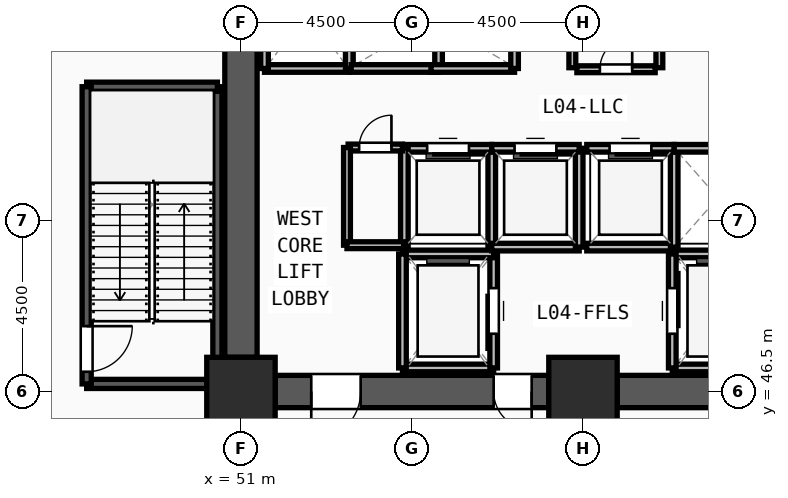
"""IFC4 building model, lengths in metres.
Left out: names, types, materials, properties, quantities, classifications, styles, units other than length and angle.
Written with IfcOpenShell. Run it as: python <this file> out.ifc"""

import sys

from ifc_helpers import new_model, si_unit, direction, frame, frame_2d, origin, origin_2d, place, context, subcontext, project, spatial, rectangle, extrude, source, transform, mapped, element, fill, save


model = new_model("IFC4")
c1 = context("Model", 3, precision=1e-05, world=origin(), true_north=direction((0.0, 1.0)))
c2 = subcontext(c1, "Body", "Model", "MODEL_VIEW")
j1 = project(units=[si_unit("LENGTHUNIT", "METRE"), si_unit("PLANEANGLEUNIT", "RADIAN")], contexts=[c1])
p1 = place(None, origin())
s1 = spatial("IfcSite", under=j1, at=p1, CompositionType="ELEMENT")
p2 = place(p1, origin())
s2 = spatial("IfcBuilding", under=s1, at=p2, CompositionType="ELEMENT")
p3 = place(p2, frame((0.0, 0.0, 14.4)))
s3 = spatial("IfcBuildingStorey", under=s2, at=p3, CompositionType="ELEMENT", Elevation=14.4)
m1 = source(origin(), c2, "Body", "SweptSolid", [
    extrude(rectangle(XDim=1.8, YDim=1.8, at=origin_2d()), origin(), (0.0, 0.0, 1.0), 4.5),
])
for number, where, z_axis, x_axis in (
    (1, (51.0, 46.5, 0.0), (0.0, 0.0, 1.0), (1.0, 0.0, 0.0)),
    (2, (60.0, 46.5, 0.0), (0.0, 0.0, 1.0), (1.0, 0.0, 0.0)),
):
    element("IfcColumn", number, at=place(p3, frame(where, z_axis=z_axis, x_axis=x_axis)), inside=s3, PredefinedType="COLUMN", context=c2, shape_type="MappedRepresentation", body=[
        mapped(m1, transform((0.0, 0.0, 0.0), x_axis=(1.0, 0.0, 0.0), y_axis=(0.0, 1.0, 0.0), z_axis=(0.0, 0.0, 1.0), scale=1.0)),
    ])
p4 = place(p3, frame((68.1, 46.5, 0.0), z_axis=(0.0, 0.0, 1.0), x_axis=(-1.0, 0.0, 0.0)))
e3 = element("IfcWall", 3, at=p4, inside=s3, PredefinedType="SHEAR", context=c2, shape_type="SweptSolid", body=[
    extrude(rectangle(XDim=7.2, YDim=0.85, at=frame_2d((3.6, 0.0))), origin(), (0.0, 0.0, 1.0), 4.25),
])
m2 = source(origin(), c2, "Body", "SweptSolid", [
    extrude(rectangle(XDim=1.3, YDim=2.2, at=frame_2d((0.65, 1.1))), frame((0.0, 0.435, 0.0), z_axis=(0.0, -1.0, 0.0), x_axis=(1.0, 0.0, 0.0)), (0.0, 0.0, 1.0), 0.87),
])
p5 = place(p4, frame((0.95, 0.0, 0.0)))
e4 = element("IfcOpeningElement", 4, at=p5, cuts=e3, PredefinedType="OPENING", context=c2, shape_type="MappedRepresentation", body=[
    mapped(m2, transform((0.0, 0.0, 0.0), x_axis=(1.0, 0.0, 0.0), y_axis=(0.0, 1.0, 0.0), z_axis=(0.0, 0.0, 1.0), scale=1.0)),
])
p6 = place(p3, frame((59.1, 46.5, 0.0), z_axis=(0.0, 0.0, 1.0), x_axis=(-1.0, 0.0, 0.0)))
e5 = element("IfcWall", 5, at=p6, inside=s3, PredefinedType="SHEAR", context=c2, shape_type="SweptSolid", body=[
    extrude(rectangle(XDim=7.2, YDim=0.85, at=frame_2d((3.6, 0.0))), origin(), (0.0, 0.0, 1.0), 4.25),
])
p7 = place(p6, frame((4.95, 0.0, 0.0)))
e6 = element("IfcOpeningElement", 6, at=p7, cuts=e5, PredefinedType="OPENING", context=c2, shape_type="MappedRepresentation", body=[
    mapped(m2, transform((0.0, 0.0, 0.0), x_axis=(1.0, 0.0, 0.0), y_axis=(0.0, 1.0, 0.0), z_axis=(0.0, 0.0, 1.0), scale=1.0)),
])
m3 = source(origin(), c2, "Body", "SweptSolid", [
    extrude(rectangle(XDim=1.0, YDim=2.2, at=frame_2d((0.5, 1.1))), frame((0.0, 0.435, 0.0), z_axis=(0.0, -1.0, 0.0), x_axis=(1.0, 0.0, 0.0)), (0.0, 0.0, 1.0), 0.87),
])
p8 = place(p6, frame((0.45, 0.0, 0.0)))
e7 = element("IfcOpeningElement", 7, at=p8, cuts=e5, PredefinedType="OPENING", context=c2, shape_type="MappedRepresentation", body=[
    mapped(m3, transform((0.0, 0.0, 0.0), x_axis=(1.0, 0.0, 0.0), y_axis=(0.0, 1.0, 0.0), z_axis=(0.0, 0.0, 1.0), scale=1.0)),
])
p9 = place(p3, frame((51.0, 47.4, 0.0), z_axis=(0.0, 0.0, 1.0), x_axis=(0.0, 1.0, 0.0)))
e8 = element("IfcWall", 8, at=p9, inside=s3, PredefinedType="SHEAR", context=c2, shape_type="SweptSolid", body=[
    extrude(rectangle(XDim=13.2, YDim=0.85, at=frame_2d((6.6, 0.0))), origin(), (0.0, 0.0, 1.0), 4.25),
])
p10 = place(p3, frame((46.94, 46.7, 0.0), z_axis=(0.0, 0.0, 1.0), x_axis=(1.0, 0.0, 0.0)))
e9 = element("IfcWall", 9, at=p10, inside=s3, PredefinedType="SOLIDWALL", context=c2, shape_type="SweptSolid", body=[
    extrude(rectangle(XDim=3.44, YDim=0.24, at=frame_2d((1.72, 0.0))), origin(), (0.0, 0.0, 1.0), 4.25),
])
p11 = place(p3, frame((50.38, 46.7, 0.0), z_axis=(0.0, 0.0, 1.0), x_axis=(0.0, 1.0, 0.0)))
e10 = element("IfcWall", 10, at=p11, inside=s3, PredefinedType="SOLIDWALL", context=c2, shape_type="SweptSolid", body=[
    extrude(rectangle(XDim=7.82, YDim=0.24, at=frame_2d((3.91, 0.0))), origin(), (0.0, 0.0, 1.0), 4.25),
])
p12 = place(p3, frame((50.38, 54.52, 0.0), z_axis=(0.0, 0.0, 1.0), x_axis=(-1.0, 0.0, 0.0)))
e11 = element("IfcWall", 11, at=p12, inside=s3, PredefinedType="SOLIDWALL", context=c2, shape_type="SweptSolid", body=[
    extrude(rectangle(XDim=3.44, YDim=0.24, at=frame_2d((1.72, 0.0))), origin(), (0.0, 0.0, 1.0), 4.25),
])
p13 = place(p3, frame((46.94, 54.52, 0.0), z_axis=(0.0, 0.0, 1.0), x_axis=(0.0, -1.0, 0.0)))
e12 = element("IfcWall", 12, at=p13, inside=s3, PredefinedType="SOLIDWALL", context=c2, shape_type="SweptSolid", body=[
    extrude(rectangle(XDim=7.82, YDim=0.24, at=frame_2d((3.91, 0.0))), origin(), (0.0, 0.0, 1.0), 4.25),
])
m4 = source(origin(), c2, "Body", "SweptSolid", [
    extrude(rectangle(XDim=1.2, YDim=2.2, at=frame_2d((0.6, 1.1))), frame((0.0, 0.13, 0.0), z_axis=(0.0, -1.0, 0.0), x_axis=(1.0, 0.0, 0.0)), (0.0, 0.0, 1.0), 0.26),
])
p14 = place(p13, frame((6.3, 0.0, 0.0)))
e13 = element("IfcOpeningElement", 13, at=p14, cuts=e12, PredefinedType="OPENING", context=c2, shape_type="MappedRepresentation", body=[
    mapped(m4, transform((0.0, 0.0, 0.0), x_axis=(1.0, 0.0, 0.0), y_axis=(0.0, 1.0, 0.0), z_axis=(0.0, 0.0, 1.0), scale=1.0)),
])
p15 = place(p3, frame((55.25, 47.12, 0.0), z_axis=(0.0, 0.0, 1.0), x_axis=(1.0, 0.0, 0.0)))
e14 = element("IfcWall", 14, at=p15, inside=s3, PredefinedType="SOLIDWALL", context=c2, shape_type="SweptSolid", body=[
    extrude(rectangle(XDim=2.4, YDim=0.2, at=frame_2d((1.2, 0.0))), origin(), (0.0, 0.0, 1.0), 4.25),
])
p16 = place(p3, frame((57.65, 47.12, 0.0), z_axis=(0.0, 0.0, 1.0), x_axis=(0.0, 1.0, 0.0)))
e15 = element("IfcWall", 15, at=p16, inside=s3, PredefinedType="SOLIDWALL", context=c2, shape_type="SweptSolid", body=[
    extrude(rectangle(XDim=3.0, YDim=0.2, at=frame_2d((1.5, 0.0))), origin(), (0.0, 0.0, 1.0), 4.25),
])
m5 = source(origin(), c2, "Body", "SweptSolid", [
    extrude(rectangle(XDim=1.2, YDim=2.3, at=frame_2d((0.6, 1.15))), frame((0.0, 0.11, 0.0), z_axis=(0.0, -1.0, 0.0), x_axis=(1.0, 0.0, 0.0)), (0.0, 0.0, 1.0), 0.22),
])
p17 = place(p16, frame((0.9, 0.0, 0.0)))
e16 = element("IfcOpeningElement", 16, at=p17, cuts=e15, PredefinedType="OPENING", context=c2, shape_type="MappedRepresentation", body=[
    mapped(m5, transform((0.0, 0.0, 0.0), x_axis=(1.0, 0.0, 0.0), y_axis=(0.0, 1.0, 0.0), z_axis=(0.0, 0.0, 1.0), scale=1.0)),
])
p18 = place(p3, frame((57.65, 50.12, 0.0), z_axis=(0.0, 0.0, 1.0), x_axis=(-1.0, 0.0, 0.0)))
e17 = element("IfcWall", 17, at=p18, inside=s3, PredefinedType="SOLIDWALL", context=c2, shape_type="SweptSolid", body=[
    extrude(rectangle(XDim=2.4, YDim=0.2, at=frame_2d((1.2, 0.0))), origin(), (0.0, 0.0, 1.0), 4.25),
])
p19 = place(p3, frame((55.25, 50.12, 0.0), z_axis=(0.0, 0.0, 1.0), x_axis=(0.0, -1.0, 0.0)))
e18 = element("IfcWall", 18, at=p19, inside=s3, PredefinedType="SOLIDWALL", context=c2, shape_type="SweptSolid", body=[
    extrude(rectangle(XDim=3.0, YDim=0.2, at=frame_2d((1.5, 0.0))), origin(), (0.0, 0.0, 1.0), 4.25),
])
for number, where, z_axis, x_axis in (
    (19, (62.35, 47.12, 0.0), (0.0, 0.0, 1.0), (1.0, 0.0, 0.0)),
    (20, (64.75, 50.12, 0.0), (0.0, 0.0, 1.0), (-1.0, 0.0, 0.0)),
):
    element("IfcWall", number, at=place(p3, frame(where, z_axis=z_axis, x_axis=x_axis)), inside=s3, PredefinedType="SOLIDWALL", context=c2, shape_type="SweptSolid", body=[
        extrude(rectangle(XDim=2.4, YDim=0.2, at=frame_2d((1.2, 0.0))), origin(), (0.0, 0.0, 1.0), 4.25),
    ])
p20 = place(p3, frame((62.35, 50.12, 0.0), z_axis=(0.0, 0.0, 1.0), x_axis=(0.0, -1.0, 0.0)))
e21 = element("IfcWall", 21, at=p20, inside=s3, PredefinedType="SOLIDWALL", context=c2, shape_type="SweptSolid", body=[
    extrude(rectangle(XDim=3.0, YDim=0.2, at=frame_2d((1.5, 0.0))), origin(), (0.0, 0.0, 1.0), 4.25),
])
p21 = place(p20, frame((0.9, 0.0, 0.0)))
e22 = element("IfcOpeningElement", 22, at=p21, cuts=e21, PredefinedType="OPENING", context=c2, shape_type="MappedRepresentation", body=[
    mapped(m5, transform((0.0, 0.0, 0.0), x_axis=(1.0, 0.0, 0.0), y_axis=(0.0, 1.0, 0.0), z_axis=(0.0, 0.0, 1.0), scale=1.0)),
])
p22 = place(p3, frame((51.62, 55.0, 0.0), z_axis=(0.0, 0.0, 1.0), x_axis=(1.0, 0.0, 0.0)))
e23 = element("IfcWall", 23, at=p22, inside=s3, PredefinedType="SOLIDWALL", context=c2, shape_type="SweptSolid", body=[
    extrude(rectangle(XDim=2.23, YDim=0.2, at=frame_2d((1.115, 0.0))), origin(), (0.0, 0.0, 1.0), 4.25),
])
for number, where, z_axis, x_axis in (
    (24, (53.85, 55.0, 0.0), (0.0, 0.0, 1.0), (0.0, 1.0, 0.0)),
    (25, (51.62, 58.0, 0.0), (0.0, 0.0, 1.0), (0.0, -1.0, 0.0)),
):
    element("IfcWall", number, at=place(p3, frame(where, z_axis=z_axis, x_axis=x_axis)), inside=s3, PredefinedType="SOLIDWALL", context=c2, shape_type="SweptSolid", body=[
        extrude(rectangle(XDim=3.0, YDim=0.2, at=frame_2d((1.5, 0.0))), origin(), (0.0, 0.0, 1.0), 4.25),
    ])
p23 = place(p3, frame((57.6, 50.3, 0.0), z_axis=(0.0, 0.0, 1.0), x_axis=(0.0, 1.0, 0.0)))
e26 = element("IfcWall", 26, at=p23, inside=s3, PredefinedType="SOLIDWALL", context=c2, shape_type="SweptSolid", body=[
    extrude(rectangle(XDim=2.6, YDim=0.2, at=frame_2d((1.3, 0.0))), origin(), (0.0, 0.0, 1.0), 4.25),
])
p24 = place(p3, frame((57.6, 52.9, 0.0), z_axis=(0.0, 0.0, 1.0), x_axis=(-1.0, 0.0, 0.0)))
e27 = element("IfcWall", 27, at=p24, inside=s3, PredefinedType="SOLIDWALL", context=c2, shape_type="SweptSolid", body=[
    extrude(rectangle(XDim=2.3, YDim=0.2, at=frame_2d((1.15, 0.0))), origin(), (0.0, 0.0, 1.0), 4.25),
])
m6 = source(origin(), c2, "Body", "SweptSolid", [
    extrude(rectangle(XDim=1.1, YDim=2.2, at=frame_2d((0.55, 1.1))), frame((0.0, 0.11, 0.0), z_axis=(0.0, -1.0, 0.0), x_axis=(1.0, 0.0, 0.0)), (0.0, 0.0, 1.0), 0.22),
])
p25 = place(p24, frame((0.6, 0.0, 0.0)))
e28 = element("IfcOpeningElement", 28, at=p25, cuts=e27, PredefinedType="OPENING", context=c2, shape_type="MappedRepresentation", body=[
    mapped(m6, transform((0.0, 0.0, 0.0), x_axis=(1.0, 0.0, 0.0), y_axis=(0.0, 1.0, 0.0), z_axis=(0.0, 0.0, 1.0), scale=1.0)),
])
p26 = place(p3, frame((55.3, 52.9, 0.0), z_axis=(0.0, 0.0, 1.0), x_axis=(0.0, -1.0, 0.0)))
e29 = element("IfcWall", 29, at=p26, inside=s3, PredefinedType="SOLIDWALL", context=c2, shape_type="SweptSolid", body=[
    extrude(rectangle(XDim=2.6, YDim=0.2, at=frame_2d((1.3, 0.0))), origin(), (0.0, 0.0, 1.0), 4.25),
])
p27 = place(p3, frame((57.6, 50.3, 0.0), z_axis=(0.0, 0.0, 1.0), x_axis=(1.0, 0.0, 0.0)))
e30 = element("IfcWall", 30, at=p27, inside=s3, PredefinedType="SOLIDWALL", context=c2, shape_type="SweptSolid", body=[
    extrude(rectangle(XDim=2.3, YDim=0.2, at=frame_2d((1.15, 0.0))), origin(), (0.0, 0.0, 1.0), 4.25),
])
p28 = place(p3, frame((59.9, 50.3, 0.0), z_axis=(0.0, 0.0, 1.0), x_axis=(0.0, 1.0, 0.0)))
e31 = element("IfcWall", 31, at=p28, inside=s3, PredefinedType="SOLIDWALL", context=c2, shape_type="SweptSolid", body=[
    extrude(rectangle(XDim=2.6, YDim=0.2, at=frame_2d((1.3, 0.0))), origin(), (0.0, 0.0, 1.0), 4.25),
])
p29 = place(p3, frame((59.9, 52.9, 0.0), z_axis=(0.0, 0.0, 1.0), x_axis=(-1.0, 0.0, 0.0)))
e32 = element("IfcWall", 32, at=p29, inside=s3, PredefinedType="SOLIDWALL", context=c2, shape_type="SweptSolid", body=[
    extrude(rectangle(XDim=2.3, YDim=0.2, at=frame_2d((1.15, 0.0))), origin(), (0.0, 0.0, 1.0), 4.25),
])
p30 = place(p29, frame((0.6, 0.0, 0.0)))
e33 = element("IfcOpeningElement", 33, at=p30, cuts=e32, PredefinedType="OPENING", context=c2, shape_type="MappedRepresentation", body=[
    mapped(m6, transform((0.0, 0.0, 0.0), x_axis=(1.0, 0.0, 0.0), y_axis=(0.0, 1.0, 0.0), z_axis=(0.0, 0.0, 1.0), scale=1.0)),
])
p31 = place(p3, frame((60.1, 50.3, 0.0), z_axis=(0.0, 0.0, 1.0), x_axis=(1.0, 0.0, 0.0)))
e34 = element("IfcWall", 34, at=p31, inside=s3, PredefinedType="SOLIDWALL", context=c2, shape_type="SweptSolid", body=[
    extrude(rectangle(XDim=2.3, YDim=0.2, at=frame_2d((1.15, 0.0))), origin(), (0.0, 0.0, 1.0), 4.25),
])
p32 = place(p3, frame((62.4, 50.3, 0.0), z_axis=(0.0, 0.0, 1.0), x_axis=(0.0, 1.0, 0.0)))
e35 = element("IfcWall", 35, at=p32, inside=s3, PredefinedType="SOLIDWALL", context=c2, shape_type="SweptSolid", body=[
    extrude(rectangle(XDim=2.6, YDim=0.2, at=frame_2d((1.3, 0.0))), origin(), (0.0, 0.0, 1.0), 4.25),
])
p33 = place(p3, frame((62.4, 52.9, 0.0), z_axis=(0.0, 0.0, 1.0), x_axis=(-1.0, 0.0, 0.0)))
e36 = element("IfcWall", 36, at=p33, inside=s3, PredefinedType="SOLIDWALL", context=c2, shape_type="SweptSolid", body=[
    extrude(rectangle(XDim=2.3, YDim=0.2, at=frame_2d((1.15, 0.0))), origin(), (0.0, 0.0, 1.0), 4.25),
])
p34 = place(p33, frame((0.6, 0.0, 0.0)))
e37 = element("IfcOpeningElement", 37, at=p34, cuts=e36, PredefinedType="OPENING", context=c2, shape_type="MappedRepresentation", body=[
    mapped(m6, transform((0.0, 0.0, 0.0), x_axis=(1.0, 0.0, 0.0), y_axis=(0.0, 1.0, 0.0), z_axis=(0.0, 0.0, 1.0), scale=1.0)),
])
for number, where, z_axis, x_axis in (
    (38, (64.7, 52.9, 0.0), (0.0, 0.0, 1.0), (-1.0, 0.0, 0.0)),
    (39, (53.9, 55.0, 0.0), (0.0, 0.0, 1.0), (1.0, 0.0, 0.0)),
):
    element("IfcWall", number, at=place(p3, frame(where, z_axis=z_axis, x_axis=x_axis)), inside=s3, PredefinedType="SOLIDWALL", context=c2, shape_type="SweptSolid", body=[
        extrude(rectangle(XDim=2.3, YDim=0.2, at=frame_2d((1.15, 0.0))), origin(), (0.0, 0.0, 1.0), 4.25),
    ])
p35 = place(p3, frame((56.2, 55.0, 0.0), z_axis=(0.0, 0.0, 1.0), x_axis=(0.0, 1.0, 0.0)))
e40 = element("IfcWall", 40, at=p35, inside=s3, PredefinedType="SOLIDWALL", context=c2, shape_type="SweptSolid", body=[
    extrude(rectangle(XDim=2.6, YDim=0.2, at=frame_2d((1.3, 0.0))), origin(), (0.0, 0.0, 1.0), 4.25),
])
p36 = place(p3, frame((56.0, 55.0, 0.0), z_axis=(0.0, 0.0, 1.0), x_axis=(1.0, 0.0, 0.0)))
e41 = element("IfcWall", 41, at=p36, inside=s3, PredefinedType="SOLIDWALL", context=c2, shape_type="SweptSolid", body=[
    extrude(rectangle(XDim=2.2, YDim=0.2, at=frame_2d((1.1, 0.0))), origin(), (0.0, 0.0, 1.0), 4.25),
])
p37 = place(p3, frame((58.2, 55.0, 0.0), z_axis=(0.0, 0.0, 1.0), x_axis=(0.0, 1.0, 0.0)))
e42 = element("IfcWall", 42, at=p37, inside=s3, PredefinedType="SOLIDWALL", context=c2, shape_type="SweptSolid", body=[
    extrude(rectangle(XDim=2.6, YDim=0.2, at=frame_2d((1.3, 0.0))), origin(), (0.0, 0.0, 1.0), 4.25),
])
p38 = place(p3, frame((59.84, 54.98, 0.0), z_axis=(0.0, 0.0, 1.0), x_axis=(1.0, 0.0, 0.0)))
e43 = element("IfcWall", 43, at=p38, inside=s3, PredefinedType="PARTITIONING", context=c2, shape_type="SweptSolid", body=[
    extrude(rectangle(XDim=2.06, YDim=0.18, at=frame_2d((1.03, 0.0))), origin(), (0.0, 0.0, 1.0), 4.25),
])
m7 = source(origin(), c2, "Body", "SweptSolid", [
    extrude(rectangle(XDim=0.85, YDim=2.1, at=frame_2d((0.425, 1.05))), frame((0.0, 0.1, 0.0), z_axis=(0.0, -1.0, 0.0), x_axis=(1.0, 0.0, 0.0)), (0.0, 0.0, 1.0), 0.2),
])
p39 = place(p38, frame((0.605, 0.0, 0.0)))
e44 = element("IfcOpeningElement", 44, at=p39, cuts=e43, PredefinedType="OPENING", context=c2, shape_type="MappedRepresentation", body=[
    mapped(m7, transform((0.0, 0.0, 0.0), x_axis=(1.0, 0.0, 0.0), y_axis=(0.0, 1.0, 0.0), z_axis=(0.0, 0.0, 1.0), scale=1.0)),
])
p40 = place(p3, frame((53.82, 52.92, 0.0), z_axis=(0.0, 0.0, 1.0), x_axis=(1.0, 0.0, 0.0)))
e45 = element("IfcWall", 45, at=p40, inside=s3, PredefinedType="PARTITIONING", context=c2, shape_type="SweptSolid", body=[
    extrude(rectangle(XDim=1.43, YDim=0.18, at=frame_2d((0.715, 0.0))), origin(), (0.0, 0.0, 1.0), 4.25),
])
p41 = place(p40, frame((0.29, 0.0, 0.0)))
e46 = element("IfcOpeningElement", 46, at=p41, cuts=e45, PredefinedType="OPENING", context=c2, shape_type="MappedRepresentation", body=[
    mapped(m7, transform((0.0, 0.0, 0.0), x_axis=(1.0, 0.0, 0.0), y_axis=(0.0, 1.0, 0.0), z_axis=(0.0, 0.0, 1.0), scale=1.0)),
])
for number, where, z_axis, x_axis in (
    (47, (59.72, 55.02, 0.0), (0.0, 0.0, 1.0), (0.0, 1.0, 0.0)),
    (48, (62.01, 55.02, 0.0), (0.0, 0.0, 1.0), (0.0, 1.0, 0.0)),
):
    element("IfcWall", number, at=place(p3, frame(where, z_axis=z_axis, x_axis=x_axis)), inside=s3, PredefinedType="PARTITIONING", context=c2, shape_type="SweptSolid", body=[
        extrude(rectangle(XDim=2.88, YDim=0.18, at=frame_2d((1.44, 0.0))), origin(), (0.0, 0.0, 1.0), 4.25),
    ])
p42 = place(p3, frame((53.79, 50.35, 0.0), z_axis=(0.0, 0.0, 1.0), x_axis=(0.0, 1.0, 0.0)))
e49 = element("IfcWall", 49, at=p42, inside=s3, PredefinedType="PARTITIONING", context=c2, shape_type="SweptSolid", body=[
    extrude(rectangle(XDim=2.57, YDim=0.18, at=frame_2d((1.285, 0.0))), origin(), (0.0, 0.0, 1.0), 4.25),
])
p43 = place(p3, frame((53.79, 50.35, 0.0), z_axis=(0.0, 0.0, 1.0), x_axis=(1.0, 0.0, 0.0)))
e50 = element("IfcWall", 50, at=p43, inside=s3, PredefinedType="PARTITIONING", context=c2, shape_type="SweptSolid", body=[
    extrude(rectangle(XDim=1.49, YDim=0.18, at=frame_2d((0.745, 0.0))), origin(), (0.0, 0.0, 1.0), 4.25),
])
m8 = source(origin(), c2, "Body", "SweptSolid", [
    extrude(rectangle(XDim=1.3, YDim=2.2, at=frame_2d((0.65, 1.1))), frame((0.0, 0.025, 0.0), z_axis=(0.0, -1.0, 0.0), x_axis=(1.0, 0.0, 0.0)), (0.0, 0.0, 1.0), 0.05),
])
p44 = place(p7, origin())
e51 = element("IfcDoor", 51, at=p44, inside=s3, OperationType="SINGLE_SWING_RIGHT", PredefinedType="DOOR", context=c2, shape_type="MappedRepresentation", body=[
    mapped(m8, transform((0.0, 0.0, 0.0), x_axis=(1.0, 0.0, 0.0), y_axis=(0.0, 1.0, 0.0), z_axis=(0.0, 0.0, 1.0), scale=1.0)),
])
fill(e6, e51)
m9 = source(origin(), c2, "Body", "SweptSolid", [
    extrude(rectangle(XDim=1.0, YDim=2.2, at=frame_2d((0.5, 1.1))), frame((0.0, 0.025, 0.0), z_axis=(0.0, -1.0, 0.0), x_axis=(1.0, 0.0, 0.0)), (0.0, 0.0, 1.0), 0.05),
])
p45 = place(p8, origin())
e52 = element("IfcDoor", 52, at=p45, inside=s3, OperationType="SINGLE_SWING_LEFT", PredefinedType="DOOR", context=c2, shape_type="MappedRepresentation", body=[
    mapped(m9, transform((0.0, 0.0, 0.0), x_axis=(1.0, 0.0, 0.0), y_axis=(0.0, 1.0, 0.0), z_axis=(0.0, 0.0, 1.0), scale=1.0)),
])
fill(e7, e52)
m10 = source(origin(), c2, "Body", "SweptSolid", [
    extrude(rectangle(XDim=1.2, YDim=2.2, at=frame_2d((0.6, 1.1))), frame((0.0, 0.025, 0.0), z_axis=(0.0, -1.0, 0.0), x_axis=(1.0, 0.0, 0.0)), (0.0, 0.0, 1.0), 0.05),
])
p46 = place(p14, origin())
e53 = element("IfcDoor", 53, at=p46, inside=s3, OperationType="SINGLE_SWING_LEFT", PredefinedType="DOOR", context=c2, shape_type="MappedRepresentation", body=[
    mapped(m10, transform((0.0, 0.0, 0.0), x_axis=(1.0, 0.0, 0.0), y_axis=(0.0, 1.0, 0.0), z_axis=(0.0, 0.0, 1.0), scale=1.0)),
])
fill(e13, e53)
m11 = source(origin(), c2, "Body", "SweptSolid", [
    extrude(rectangle(XDim=1.2, YDim=2.3, at=frame_2d((0.6, 1.15))), frame((0.0, 0.025, 0.0), z_axis=(0.0, -1.0, 0.0), x_axis=(1.0, 0.0, 0.0)), (0.0, 0.0, 1.0), 0.05),
])
p47 = place(p17, origin())
e54 = element("IfcDoor", 54, at=p47, inside=s3, OperationType="SLIDING_TO_LEFT", PredefinedType="DOOR", context=c2, shape_type="MappedRepresentation", body=[
    mapped(m11, transform((0.0, 0.0, 0.0), x_axis=(1.0, 0.0, 0.0), y_axis=(0.0, 1.0, 0.0), z_axis=(0.0, 0.0, 1.0), scale=1.0)),
])
fill(e16, e54)
p48 = place(p21, origin())
e55 = element("IfcDoor", 55, at=p48, inside=s3, OperationType="SLIDING_TO_LEFT", PredefinedType="DOOR", context=c2, shape_type="MappedRepresentation", body=[
    mapped(m11, transform((0.0, 0.0, 0.0), x_axis=(1.0, 0.0, 0.0), y_axis=(0.0, 1.0, 0.0), z_axis=(0.0, 0.0, 1.0), scale=1.0)),
])
fill(e22, e55)
m12 = source(origin(), c2, "Body", "SweptSolid", [
    extrude(rectangle(XDim=1.1, YDim=2.2, at=frame_2d((0.55, 1.1))), frame((0.0, 0.025, 0.0), z_axis=(0.0, -1.0, 0.0), x_axis=(1.0, 0.0, 0.0)), (0.0, 0.0, 1.0), 0.05),
])
p49 = place(p25, origin())
e56 = element("IfcDoor", 56, at=p49, inside=s3, OperationType="SLIDING_TO_LEFT", PredefinedType="DOOR", context=c2, shape_type="MappedRepresentation", body=[
    mapped(m12, transform((0.0, 0.0, 0.0), x_axis=(1.0, 0.0, 0.0), y_axis=(0.0, 1.0, 0.0), z_axis=(0.0, 0.0, 1.0), scale=1.0)),
])
fill(e28, e56)
p50 = place(p30, origin())
e57 = element("IfcDoor", 57, at=p50, inside=s3, OperationType="SLIDING_TO_LEFT", PredefinedType="DOOR", context=c2, shape_type="MappedRepresentation", body=[
    mapped(m12, transform((0.0, 0.0, 0.0), x_axis=(1.0, 0.0, 0.0), y_axis=(0.0, 1.0, 0.0), z_axis=(0.0, 0.0, 1.0), scale=1.0)),
])
fill(e33, e57)
p51 = place(p34, origin())
e58 = element("IfcDoor", 58, at=p51, inside=s3, OperationType="SLIDING_TO_LEFT", PredefinedType="DOOR", context=c2, shape_type="MappedRepresentation", body=[
    mapped(m12, transform((0.0, 0.0, 0.0), x_axis=(1.0, 0.0, 0.0), y_axis=(0.0, 1.0, 0.0), z_axis=(0.0, 0.0, 1.0), scale=1.0)),
])
fill(e37, e58)
m13 = source(origin(), c2, "Body", "SweptSolid", [
    extrude(rectangle(XDim=0.85, YDim=2.1, at=frame_2d((0.425, 1.05))), frame((0.0, 0.025, 0.0), z_axis=(0.0, -1.0, 0.0), x_axis=(1.0, 0.0, 0.0)), (0.0, 0.0, 1.0), 0.05),
])
p52 = place(p39, origin())
e59 = element("IfcDoor", 59, at=p52, inside=s3, OperationType="SINGLE_SWING_RIGHT", PredefinedType="DOOR", context=c2, shape_type="MappedRepresentation", body=[
    mapped(m13, transform((0.0, 0.0, 0.0), x_axis=(1.0, 0.0, 0.0), y_axis=(0.0, 1.0, 0.0), z_axis=(0.0, 0.0, 1.0), scale=1.0)),
])
fill(e44, e59)
p53 = place(p41, origin())
e60 = element("IfcDoor", 60, at=p53, inside=s3, OperationType="SINGLE_SWING_RIGHT", PredefinedType="DOOR", context=c2, shape_type="MappedRepresentation", body=[
    mapped(m13, transform((0.0, 0.0, 0.0), x_axis=(1.0, 0.0, 0.0), y_axis=(0.0, 1.0, 0.0), z_axis=(0.0, 0.0, 1.0), scale=1.0)),
])
fill(e46, e60)
save(model, sys.argv[1])
